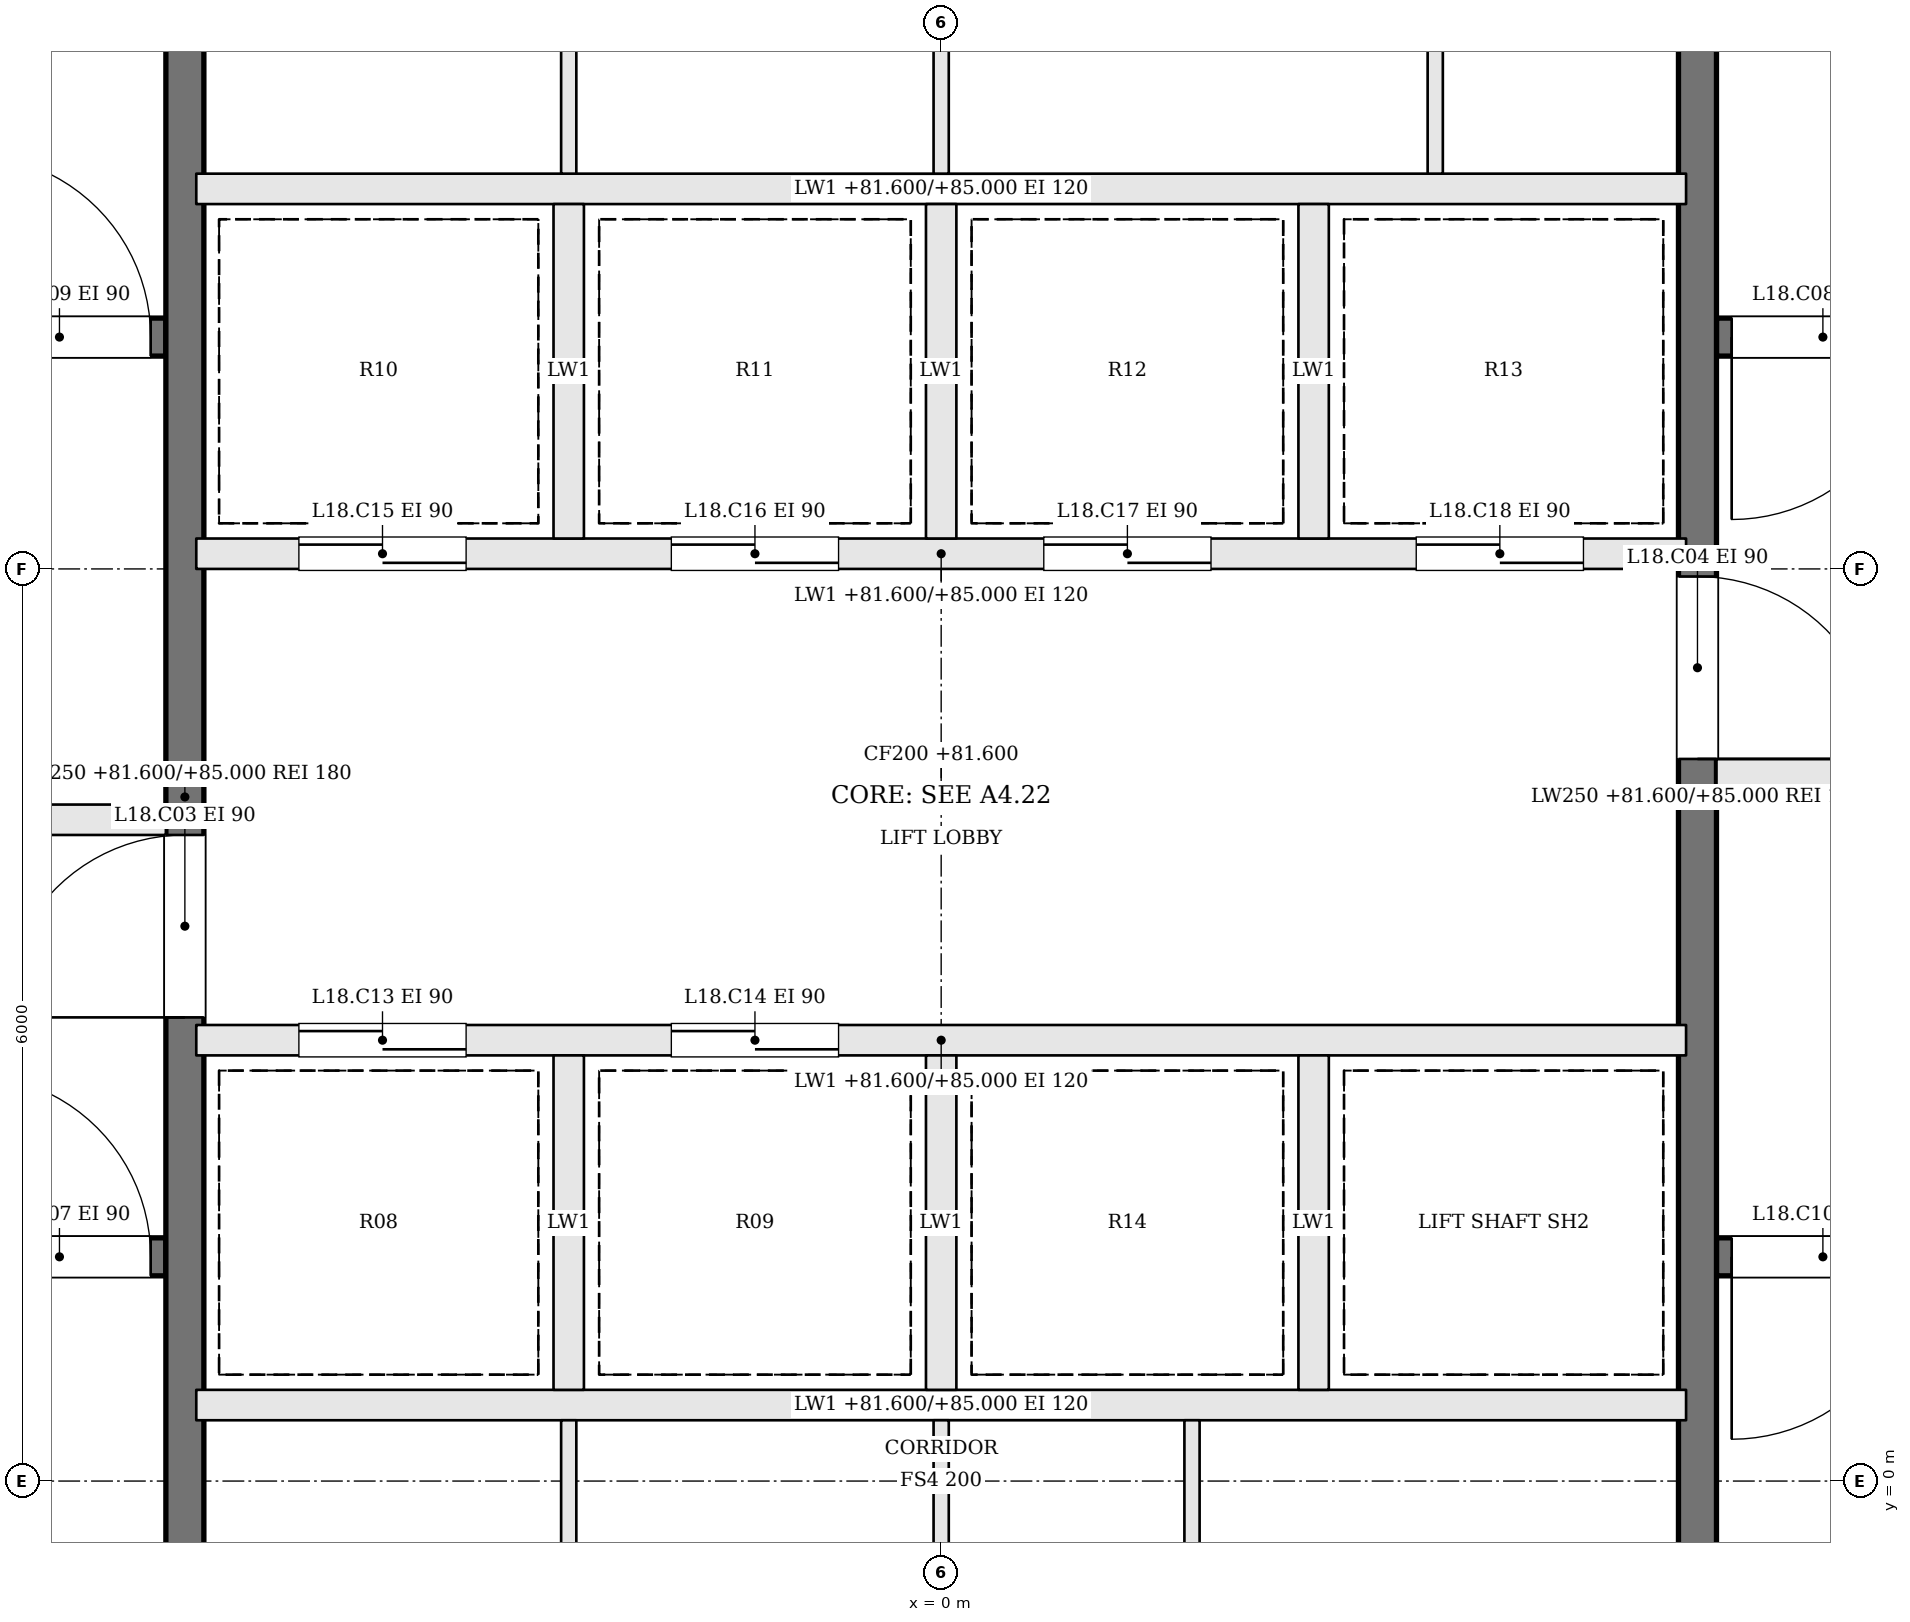
"""IFC4 building model, lengths in metres.
Left out: names, types, materials, properties, quantities, classifications, styles, units other than length and angle.
Written with IfcOpenShell. Run it as: python <this file> out.ifc"""

import sys

from ifc_helpers import new_model, si_unit, direction, frame, frame_2d, origin, place, context, subcontext, project, spatial, rectangle, extrude, element, fill, save


model = new_model("IFC4")
c1 = context("Model", 3, precision=1e-05, world=origin(), true_north=direction((0.0, 1.0)))
c2 = subcontext(c1, "Body", "Model", "MODEL_VIEW")
j1 = project(units=[si_unit("LENGTHUNIT", "METRE"), si_unit("PLANEANGLEUNIT", "RADIAN")], contexts=[c1])
p1 = place(None, origin())
s1 = spatial("IfcSite", under=j1, at=p1, CompositionType="ELEMENT")
p2 = place(p1, origin())
s2 = spatial("IfcBuilding", under=s1, at=p2, CompositionType="ELEMENT")
p3 = place(p2, frame((0.0, 0.0, 81.6)))
s3 = spatial("IfcBuildingStorey", under=s2, at=p3, CompositionType="ELEMENT", Elevation=81.6)
p4 = place(p3, frame((-11.9, 1.475, 0.0), z_axis=(0.0, 0.0, 1.0), x_axis=(1.0, 0.0, 0.0)))
e1 = element("IfcWall", 1, at=p4, inside=s3, PredefinedType="SOLIDWALL", context=c2, shape_type="SweptSolid", body=[
    extrude(rectangle(XDim=6.8, YDim=0.25, at=frame_2d((3.4, 0.0))), origin(), (0.0, 0.0, 1.0), 3.4),
])
p5 = place(p4, frame((5.5, 0.0, 0.0)))
e2 = element("IfcOpeningElement", 2, at=p5, cuts=e1, PredefinedType="OPENING", context=c2, shape_type="SweptSolid", body=[
    extrude(rectangle(XDim=1.2, YDim=2.1, at=frame_2d((0.6, 1.05))), frame((0.0, 0.135, 0.0), z_axis=(0.0, -1.0, 0.0), x_axis=(1.0, 0.0, 0.0)), (0.0, 0.0, 1.0), 0.27),
])
p6 = place(p3, frame((11.9, 7.525, 0.0), z_axis=(0.0, 0.0, 1.0), x_axis=(-1.0, 0.0, 0.0)))
e3 = element("IfcWall", 3, at=p6, inside=s3, PredefinedType="SOLIDWALL", context=c2, shape_type="SweptSolid", body=[
    extrude(rectangle(XDim=6.8, YDim=0.25, at=frame_2d((3.4, 0.0))), origin(), (0.0, 0.0, 1.0), 3.4),
])
p7 = place(p6, frame((5.5, 0.0, 0.0)))
e4 = element("IfcOpeningElement", 4, at=p7, cuts=e3, PredefinedType="OPENING", context=c2, shape_type="SweptSolid", body=[
    extrude(rectangle(XDim=1.2, YDim=2.1, at=frame_2d((0.6, 1.05))), frame((0.0, 0.135, 0.0), z_axis=(0.0, -1.0, 0.0), x_axis=(1.0, 0.0, 0.0)), (0.0, 0.0, 1.0), 0.27),
])
p8 = place(p3, frame((-11.9, 4.35, 0.0), z_axis=(0.0, 0.0, 1.0), x_axis=(1.0, 0.0, 0.0)))
e5 = element("IfcWall", 5, at=p8, inside=s3, PredefinedType="SOLIDWALL", context=c2, shape_type="SweptSolid", body=[
    extrude(rectangle(XDim=6.8, YDim=0.2, at=frame_2d((3.4, 0.0))), origin(), (0.0, 0.0, 1.0), 3.4),
])
p9 = place(p8, frame((4.1, 0.0, 0.0)))
e6 = element("IfcOpeningElement", 6, at=p9, cuts=e5, PredefinedType="OPENING", context=c2, shape_type="SweptSolid", body=[
    extrude(rectangle(XDim=1.2, YDim=2.1, at=frame_2d((0.6, 1.05))), frame((0.0, 0.11, 0.0), z_axis=(0.0, -1.0, 0.0), x_axis=(1.0, 0.0, 0.0)), (0.0, 0.0, 1.0), 0.22),
])
p10 = place(p8, frame((0.8, 0.0, 0.0)))
e7 = element("IfcOpeningElement", 7, at=p10, cuts=e5, PredefinedType="OPENING", context=c2, shape_type="SweptSolid", body=[
    extrude(rectangle(XDim=1.2, YDim=2.1, at=frame_2d((0.6, 1.05))), frame((0.0, 0.11, 0.0), z_axis=(0.0, -1.0, 0.0), x_axis=(1.0, 0.0, 0.0)), (0.0, 0.0, 1.0), 0.22),
])
p11 = place(p3, frame((11.9, 4.65, 0.0), z_axis=(0.0, 0.0, 1.0), x_axis=(-1.0, 0.0, 0.0)))
e8 = element("IfcWall", 8, at=p11, inside=s3, PredefinedType="SOLIDWALL", context=c2, shape_type="SweptSolid", body=[
    extrude(rectangle(XDim=6.8, YDim=0.2, at=frame_2d((3.4, 0.0))), origin(), (0.0, 0.0, 1.0), 3.4),
])
p12 = place(p11, frame((4.1, 0.0, 0.0)))
e9 = element("IfcOpeningElement", 9, at=p12, cuts=e8, PredefinedType="OPENING", context=c2, shape_type="SweptSolid", body=[
    extrude(rectangle(XDim=1.2, YDim=2.1, at=frame_2d((0.6, 1.05))), frame((0.0, 0.11, 0.0), z_axis=(0.0, -1.0, 0.0), x_axis=(1.0, 0.0, 0.0)), (0.0, 0.0, 1.0), 0.22),
])
p13 = place(p11, frame((0.8, 0.0, 0.0)))
e10 = element("IfcOpeningElement", 10, at=p13, cuts=e8, PredefinedType="OPENING", context=c2, shape_type="SweptSolid", body=[
    extrude(rectangle(XDim=1.2, YDim=2.1, at=frame_2d((0.6, 1.05))), frame((0.0, 0.11, 0.0), z_axis=(0.0, -1.0, 0.0), x_axis=(1.0, 0.0, 0.0)), (0.0, 0.0, 1.0), 0.22),
])
p14 = place(p3, frame((-11.9, 7.525, 0.0), z_axis=(0.0, 0.0, 1.0), x_axis=(1.0, 0.0, 0.0)))
e11 = element("IfcWall", 11, at=p14, inside=s3, PredefinedType="SOLIDWALL", context=c2, shape_type="SweptSolid", body=[
    extrude(rectangle(XDim=6.8, YDim=0.25, at=frame_2d((3.4, 0.0))), origin(), (0.0, 0.0, 1.0), 3.4),
])
p15 = place(p14, frame((5.5, 0.0, 0.0)))
e12 = element("IfcOpeningElement", 12, at=p15, cuts=e11, PredefinedType="OPENING", context=c2, shape_type="SweptSolid", body=[
    extrude(rectangle(XDim=1.2, YDim=2.1, at=frame_2d((0.6, 1.05))), frame((0.0, 0.135, 0.0), z_axis=(0.0, -1.0, 0.0), x_axis=(1.0, 0.0, 0.0)), (0.0, 0.0, 1.0), 0.27),
])
p16 = place(p3, frame((11.9, 1.475, 0.0), z_axis=(0.0, 0.0, 1.0), x_axis=(-1.0, 0.0, 0.0)))
e13 = element("IfcWall", 13, at=p16, inside=s3, PredefinedType="SOLIDWALL", context=c2, shape_type="SweptSolid", body=[
    extrude(rectangle(XDim=6.8, YDim=0.25, at=frame_2d((3.4, 0.0))), origin(), (0.0, 0.0, 1.0), 3.4),
])
p17 = place(p16, frame((5.5, 0.0, 0.0)))
e14 = element("IfcOpeningElement", 14, at=p17, cuts=e13, PredefinedType="OPENING", context=c2, shape_type="SweptSolid", body=[
    extrude(rectangle(XDim=1.2, YDim=2.1, at=frame_2d((0.6, 1.05))), frame((0.0, 0.135, 0.0), z_axis=(0.0, -1.0, 0.0), x_axis=(1.0, 0.0, 0.0)), (0.0, 0.0, 1.0), 0.27),
])
p18 = place(p3, frame((-4.975, -1.9, 0.0), z_axis=(0.0, 0.0, 1.0), x_axis=(0.0, 1.0, 0.0)))
e15 = element("IfcWall", 15, at=p18, inside=s3, PredefinedType="SOLIDWALL", context=c2, shape_type="SweptSolid", body=[
    extrude(rectangle(XDim=12.8, YDim=0.25, at=frame_2d((6.4, 0.0))), origin(), (0.0, 0.0, 1.0), 3.4),
])
p19 = place(p18, frame((4.95, 0.0, 0.0)))
e16 = element("IfcOpeningElement", 16, at=p19, cuts=e15, PredefinedType="OPENING", context=c2, shape_type="SweptSolid", body=[
    extrude(rectangle(XDim=1.2, YDim=2.1, at=frame_2d((0.6, 1.05))), frame((0.0, 0.135, 0.0), z_axis=(0.0, -1.0, 0.0), x_axis=(1.0, 0.0, 0.0)), (0.0, 0.0, 1.0), 0.27),
])
p20 = place(p3, frame((4.975, 10.9, 0.0), z_axis=(0.0, 0.0, 1.0), x_axis=(0.0, -1.0, 0.0)))
e17 = element("IfcWall", 17, at=p20, inside=s3, PredefinedType="SOLIDWALL", context=c2, shape_type="SweptSolid", body=[
    extrude(rectangle(XDim=12.8, YDim=0.25, at=frame_2d((6.4, 0.0))), origin(), (0.0, 0.0, 1.0), 3.4),
])
p21 = place(p20, frame((4.95, 0.0, 0.0)))
e18 = element("IfcOpeningElement", 18, at=p21, cuts=e17, PredefinedType="OPENING", context=c2, shape_type="SweptSolid", body=[
    extrude(rectangle(XDim=1.2, YDim=2.1, at=frame_2d((0.6, 1.05))), frame((0.0, 0.135, 0.0), z_axis=(0.0, -1.0, 0.0), x_axis=(1.0, 0.0, 0.0)), (0.0, 0.0, 1.0), 0.27),
])
p22 = place(p3, frame((-4.9, 0.5, 0.0), z_axis=(0.0, 0.0, 1.0), x_axis=(1.0, 0.0, 0.0)))
e19 = element("IfcWall", 19, at=p22, inside=s3, PredefinedType="SOLIDWALL", context=c2, shape_type="SweptSolid", body=[
    extrude(rectangle(XDim=9.8, YDim=0.2, at=frame_2d((4.9, 0.0))), origin(), (0.0, 0.0, 1.0), 3.4),
])
p23 = place(p3, frame((-4.9, 2.9, 0.0), z_axis=(0.0, 0.0, 1.0), x_axis=(1.0, 0.0, 0.0)))
e20 = element("IfcWall", 20, at=p23, inside=s3, PredefinedType="SOLIDWALL", context=c2, shape_type="SweptSolid", body=[
    extrude(rectangle(XDim=9.8, YDim=0.2, at=frame_2d((4.9, 0.0))), origin(), (0.0, 0.0, 1.0), 3.4),
])
p24 = place(p23, frame((0.675, 0.0, 0.0)))
e21 = element("IfcOpeningElement", 21, at=p24, cuts=e20, PredefinedType="OPENING", context=c2, shape_type="SweptSolid", body=[
    extrude(rectangle(XDim=1.1, YDim=2.1, at=frame_2d((0.55, 1.05))), frame((0.0, 0.11, 0.0), z_axis=(0.0, -1.0, 0.0), x_axis=(1.0, 0.0, 0.0)), (0.0, 0.0, 1.0), 0.22),
])
p25 = place(p23, frame((3.125, 0.0, 0.0)))
e22 = element("IfcOpeningElement", 22, at=p25, cuts=e20, PredefinedType="OPENING", context=c2, shape_type="SweptSolid", body=[
    extrude(rectangle(XDim=1.1, YDim=2.1, at=frame_2d((0.55, 1.05))), frame((0.0, 0.11, 0.0), z_axis=(0.0, -1.0, 0.0), x_axis=(1.0, 0.0, 0.0)), (0.0, 0.0, 1.0), 0.22),
])
p26 = place(p3, frame((-4.9, 6.1, 0.0), z_axis=(0.0, 0.0, 1.0), x_axis=(1.0, 0.0, 0.0)))
e23 = element("IfcWall", 23, at=p26, inside=s3, PredefinedType="SOLIDWALL", context=c2, shape_type="SweptSolid", body=[
    extrude(rectangle(XDim=9.8, YDim=0.2, at=frame_2d((4.9, 0.0))), origin(), (0.0, 0.0, 1.0), 3.4),
])
p27 = place(p26, frame((0.675, 0.0, 0.0)))
e24 = element("IfcOpeningElement", 24, at=p27, cuts=e23, PredefinedType="OPENING", context=c2, shape_type="SweptSolid", body=[
    extrude(rectangle(XDim=1.1, YDim=2.1, at=frame_2d((0.55, 1.05))), frame((0.0, 0.11, 0.0), z_axis=(0.0, -1.0, 0.0), x_axis=(1.0, 0.0, 0.0)), (0.0, 0.0, 1.0), 0.22),
])
p28 = place(p26, frame((3.125, 0.0, 0.0)))
e25 = element("IfcOpeningElement", 25, at=p28, cuts=e23, PredefinedType="OPENING", context=c2, shape_type="SweptSolid", body=[
    extrude(rectangle(XDim=1.1, YDim=2.1, at=frame_2d((0.55, 1.05))), frame((0.0, 0.11, 0.0), z_axis=(0.0, -1.0, 0.0), x_axis=(1.0, 0.0, 0.0)), (0.0, 0.0, 1.0), 0.22),
])
p29 = place(p26, frame((5.575, 0.0, 0.0)))
e26 = element("IfcOpeningElement", 26, at=p29, cuts=e23, PredefinedType="OPENING", context=c2, shape_type="SweptSolid", body=[
    extrude(rectangle(XDim=1.1, YDim=2.1, at=frame_2d((0.55, 1.05))), frame((0.0, 0.11, 0.0), z_axis=(0.0, -1.0, 0.0), x_axis=(1.0, 0.0, 0.0)), (0.0, 0.0, 1.0), 0.22),
])
p30 = place(p26, frame((8.025, 0.0, 0.0)))
e27 = element("IfcOpeningElement", 27, at=p30, cuts=e23, PredefinedType="OPENING", context=c2, shape_type="SweptSolid", body=[
    extrude(rectangle(XDim=1.1, YDim=2.1, at=frame_2d((0.55, 1.05))), frame((0.0, 0.11, 0.0), z_axis=(0.0, -1.0, 0.0), x_axis=(1.0, 0.0, 0.0)), (0.0, 0.0, 1.0), 0.22),
])
p31 = place(p3, frame((-4.9, 8.5, 0.0), z_axis=(0.0, 0.0, 1.0), x_axis=(1.0, 0.0, 0.0)))
e28 = element("IfcWall", 28, at=p31, inside=s3, PredefinedType="SOLIDWALL", context=c2, shape_type="SweptSolid", body=[
    extrude(rectangle(XDim=9.8, YDim=0.2, at=frame_2d((4.9, 0.0))), origin(), (0.0, 0.0, 1.0), 3.4),
])
for number, where, z_axis, x_axis in (
    (29, (-2.45, 0.6, 0.0), (0.0, 0.0, 1.0), (0.0, 1.0, 0.0)),
    (30, (0.0, 0.6, 0.0), (0.0, 0.0, 1.0), (0.0, 1.0, 0.0)),
    (31, (2.45, 0.6, 0.0), (0.0, 0.0, 1.0), (0.0, 1.0, 0.0)),
    (32, (-2.45, 6.2, 0.0), (0.0, 0.0, 1.0), (0.0, 1.0, 0.0)),
    (33, (0.0, 6.2, 0.0), (0.0, 0.0, 1.0), (0.0, 1.0, 0.0)),
    (34, (2.45, 6.2, 0.0), (0.0, 0.0, 1.0), (0.0, 1.0, 0.0)),
):
    element("IfcWall", number, at=place(p3, frame(where, z_axis=z_axis, x_axis=x_axis)), inside=s3, PredefinedType="SOLIDWALL", context=c2, shape_type="SweptSolid", body=[
        extrude(rectangle(XDim=2.2, YDim=0.2, at=frame_2d((1.1, 0.0))), origin(), (0.0, 0.0, 1.0), 3.4),
    ])
for number, where, z_axis, x_axis in (
    (35, (-2.45, -1.9, 0.0), (0.0, 0.0, 1.0), (0.0, 1.0, 0.0)),
    (36, (0.0, -1.9, 0.0), (0.0, 0.0, 1.0), (0.0, 1.0, 0.0)),
    (37, (1.65, -1.9, 0.0), (0.0, 0.0, 1.0), (0.0, 1.0, 0.0)),
    (38, (-2.45, 8.6, 0.0), (0.0, 0.0, 1.0), (0.0, 1.0, 0.0)),
    (39, (0.0, 8.6, 0.0), (0.0, 0.0, 1.0), (0.0, 1.0, 0.0)),
    (40, (3.25, 8.6, 0.0), (0.0, 0.0, 1.0), (0.0, 1.0, 0.0)),
):
    element("IfcWall", number, at=place(p3, frame(where, z_axis=z_axis, x_axis=x_axis)), inside=s3, PredefinedType="PARTITIONING", context=c2, shape_type="SweptSolid", body=[
        extrude(rectangle(XDim=2.3, YDim=0.1, at=frame_2d((1.15, 0.0))), origin(), (0.0, 0.0, 1.0), 3.4),
    ])
p32 = place(p19, origin())
e41 = element("IfcDoor", 41, at=p32, inside=s3, OperationType="SINGLE_SWING_LEFT", PredefinedType="DOOR", context=c2, shape_type="SweptSolid", body=[
    extrude(rectangle(XDim=1.2, YDim=2.1, at=frame_2d((0.6, 1.05))), frame((0.0, 0.025, 0.0), z_axis=(0.0, -1.0, 0.0), x_axis=(1.0, 0.0, 0.0)), (0.0, 0.0, 1.0), 0.05),
])
fill(e16, e41)
p33 = place(p21, origin())
e42 = element("IfcDoor", 42, at=p33, inside=s3, OperationType="SINGLE_SWING_RIGHT", PredefinedType="DOOR", context=c2, shape_type="SweptSolid", body=[
    extrude(rectangle(XDim=1.2, YDim=2.1, at=frame_2d((0.6, 1.05))), frame((0.0, 0.025, 0.0), z_axis=(0.0, -1.0, 0.0), x_axis=(1.0, 0.0, 0.0)), (0.0, 0.0, 1.0), 0.05),
])
fill(e18, e42)
p34 = place(p5, origin())
e43 = element("IfcDoor", 43, at=p34, inside=s3, OperationType="SINGLE_SWING_LEFT", PredefinedType="DOOR", context=c2, shape_type="SweptSolid", body=[
    extrude(rectangle(XDim=1.2, YDim=2.1, at=frame_2d((0.6, 1.05))), frame((0.0, 0.025, 0.0), z_axis=(0.0, -1.0, 0.0), x_axis=(1.0, 0.0, 0.0)), (0.0, 0.0, 1.0), 0.05),
])
fill(e2, e43)
p35 = place(p7, origin())
e44 = element("IfcDoor", 44, at=p35, inside=s3, OperationType="SINGLE_SWING_RIGHT", PredefinedType="DOOR", context=c2, shape_type="SweptSolid", body=[
    extrude(rectangle(XDim=1.2, YDim=2.1, at=frame_2d((0.6, 1.05))), frame((0.0, 0.025, 0.0), z_axis=(0.0, -1.0, 0.0), x_axis=(1.0, 0.0, 0.0)), (0.0, 0.0, 1.0), 0.05),
])
fill(e4, e44)
p36 = place(p15, origin())
e45 = element("IfcDoor", 45, at=p36, inside=s3, OperationType="SINGLE_SWING_LEFT", PredefinedType="DOOR", context=c2, shape_type="SweptSolid", body=[
    extrude(rectangle(XDim=1.2, YDim=2.1, at=frame_2d((0.6, 1.05))), frame((0.0, 0.025, 0.0), z_axis=(0.0, -1.0, 0.0), x_axis=(1.0, 0.0, 0.0)), (0.0, 0.0, 1.0), 0.05),
])
fill(e12, e45)
p37 = place(p17, origin())
e46 = element("IfcDoor", 46, at=p37, inside=s3, OperationType="SINGLE_SWING_RIGHT", PredefinedType="DOOR", context=c2, shape_type="SweptSolid", body=[
    extrude(rectangle(XDim=1.2, YDim=2.1, at=frame_2d((0.6, 1.05))), frame((0.0, 0.025, 0.0), z_axis=(0.0, -1.0, 0.0), x_axis=(1.0, 0.0, 0.0)), (0.0, 0.0, 1.0), 0.05),
])
fill(e14, e46)
p38 = place(p24, origin())
e47 = element("IfcDoor", 47, at=p38, inside=s3, OperationType="SLIDING_TO_RIGHT", PredefinedType="DOOR", context=c2, shape_type="SweptSolid", body=[
    extrude(rectangle(XDim=1.1, YDim=2.1, at=frame_2d((0.55, 1.05))), frame((0.0, 0.025, 0.0), z_axis=(0.0, -1.0, 0.0), x_axis=(1.0, 0.0, 0.0)), (0.0, 0.0, 1.0), 0.05),
])
fill(e21, e47)
p39 = place(p25, origin())
e48 = element("IfcDoor", 48, at=p39, inside=s3, OperationType="SLIDING_TO_LEFT", PredefinedType="DOOR", context=c2, shape_type="SweptSolid", body=[
    extrude(rectangle(XDim=1.1, YDim=2.1, at=frame_2d((0.55, 1.05))), frame((0.0, 0.025, 0.0), z_axis=(0.0, -1.0, 0.0), x_axis=(1.0, 0.0, 0.0)), (0.0, 0.0, 1.0), 0.05),
])
fill(e22, e48)
p40 = place(p27, origin())
e49 = element("IfcDoor", 49, at=p40, inside=s3, OperationType="SLIDING_TO_RIGHT", PredefinedType="DOOR", context=c2, shape_type="SweptSolid", body=[
    extrude(rectangle(XDim=1.1, YDim=2.1, at=frame_2d((0.55, 1.05))), frame((0.0, 0.025, 0.0), z_axis=(0.0, -1.0, 0.0), x_axis=(1.0, 0.0, 0.0)), (0.0, 0.0, 1.0), 0.05),
])
fill(e24, e49)
p41 = place(p28, origin())
e50 = element("IfcDoor", 50, at=p41, inside=s3, OperationType="SLIDING_TO_LEFT", PredefinedType="DOOR", context=c2, shape_type="SweptSolid", body=[
    extrude(rectangle(XDim=1.1, YDim=2.1, at=frame_2d((0.55, 1.05))), frame((0.0, 0.025, 0.0), z_axis=(0.0, -1.0, 0.0), x_axis=(1.0, 0.0, 0.0)), (0.0, 0.0, 1.0), 0.05),
])
fill(e25, e50)
p42 = place(p29, origin())
e51 = element("IfcDoor", 51, at=p42, inside=s3, OperationType="SLIDING_TO_RIGHT", PredefinedType="DOOR", context=c2, shape_type="SweptSolid", body=[
    extrude(rectangle(XDim=1.1, YDim=2.1, at=frame_2d((0.55, 1.05))), frame((0.0, 0.025, 0.0), z_axis=(0.0, -1.0, 0.0), x_axis=(1.0, 0.0, 0.0)), (0.0, 0.0, 1.0), 0.05),
])
fill(e26, e51)
p43 = place(p30, origin())
e52 = element("IfcDoor", 52, at=p43, inside=s3, OperationType="SLIDING_TO_LEFT", PredefinedType="DOOR", context=c2, shape_type="SweptSolid", body=[
    extrude(rectangle(XDim=1.1, YDim=2.1, at=frame_2d((0.55, 1.05))), frame((0.0, 0.025, 0.0), z_axis=(0.0, -1.0, 0.0), x_axis=(1.0, 0.0, 0.0)), (0.0, 0.0, 1.0), 0.05),
])
fill(e27, e52)
save(model, sys.argv[1])
